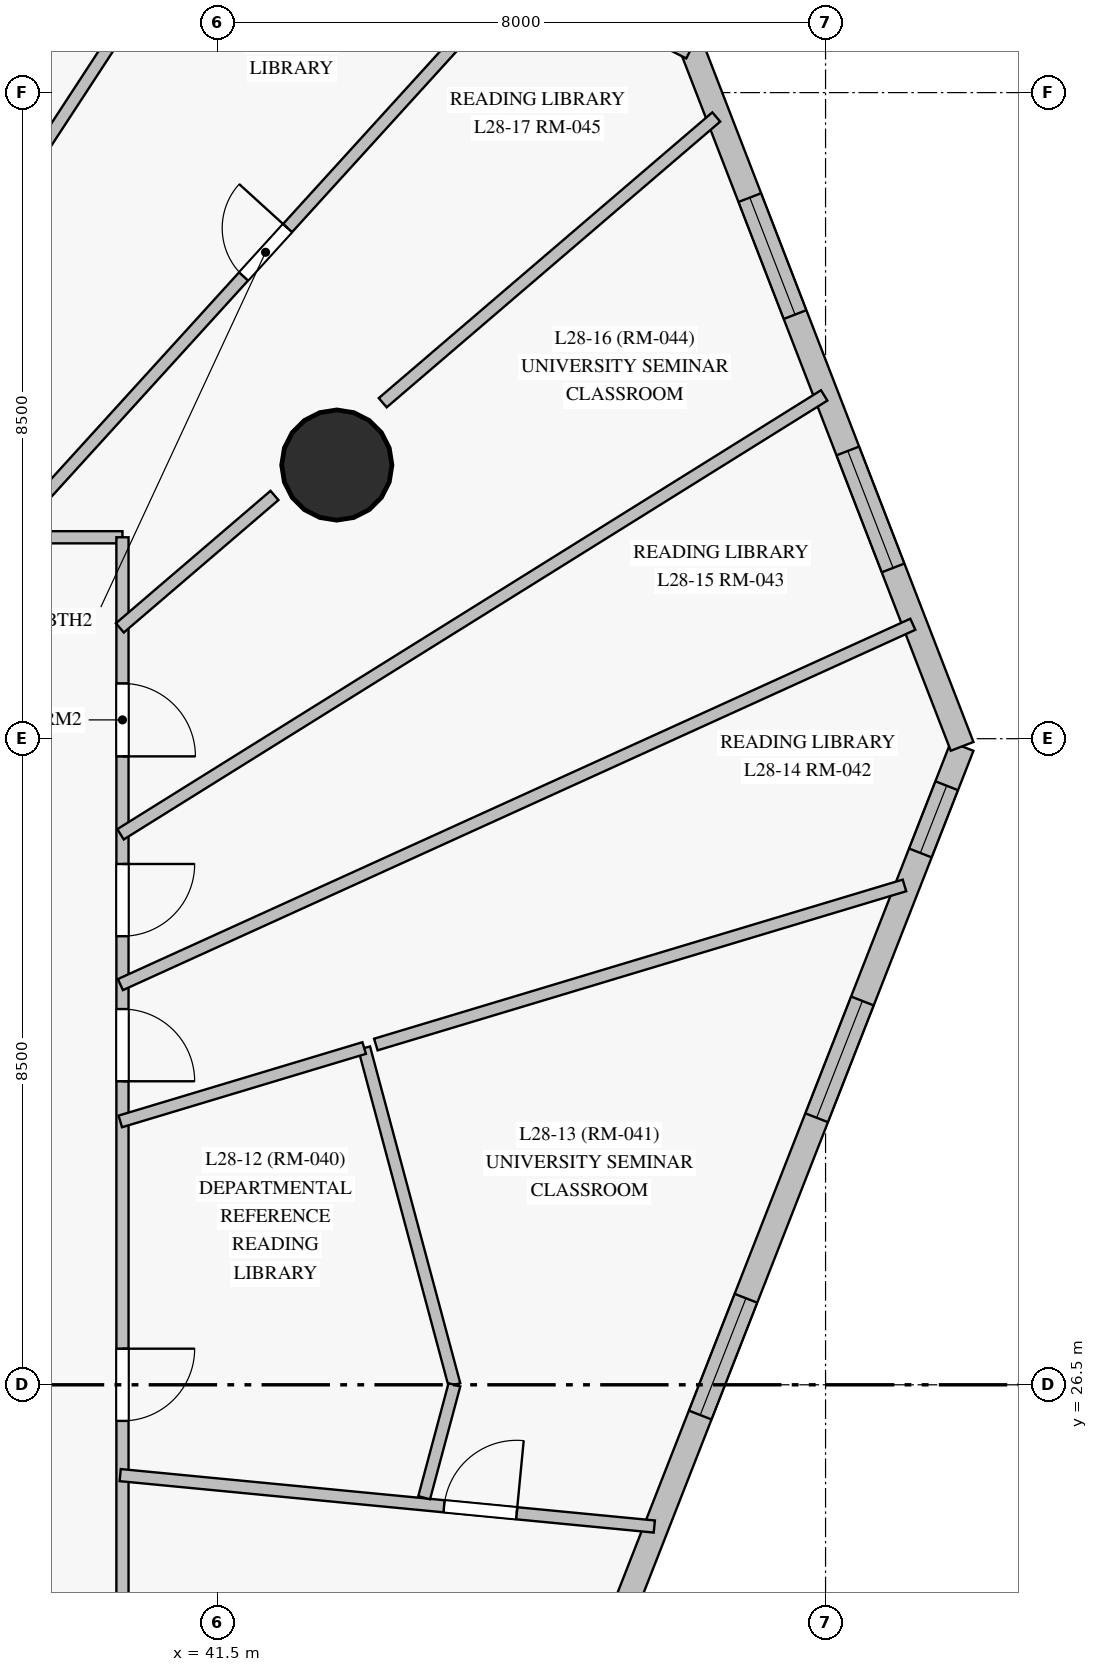
"""IFC4 building model, lengths in metres.
Left out: names, types, materials, properties, quantities, classifications, styles, units other than length and angle.
Written with IfcOpenShell. Run it as: python <this file> out.ifc"""

import sys

from ifc_helpers import new_model, si_unit, direction, frame, frame_2d, origin, origin_with_axes, origin_2d, place, context, subcontext, project, spatial, rectangle, circle, extrude, source, transform, mapped, element, fill, save


model = new_model("IFC4")
c1 = context("Model", 3, precision=1e-05, world=origin(), true_north=direction((0.0, 1.0)))
c2 = subcontext(c1, "Body", "Model", "MODEL_VIEW")
j1 = project(units=[si_unit("LENGTHUNIT", "METRE"), si_unit("PLANEANGLEUNIT", "RADIAN")], contexts=[c1])
p1 = place(None, origin())
s1 = spatial("IfcSite", under=j1, at=p1, CompositionType="ELEMENT")
p2 = place(p1, origin())
s2 = spatial("IfcBuilding", under=s1, at=p2, CompositionType="ELEMENT")
p3 = place(p2, frame((0.0, 0.0, 105.35)))
s3 = spatial("IfcBuildingStorey", under=s2, at=p3, CompositionType="ELEMENT", Elevation=105.35)
m1 = source(origin_with_axes(), c2, "Body", "SweptSolid", [
    extrude(circle(Radius=0.725, at=origin_2d()), origin(), (0.0, 0.0, 1.0), 3.05),
])
p4 = place(p3, frame((43.07, 38.6, 0.0), z_axis=(0.0, 0.0, 1.0), x_axis=(1.0, 0.0, 0.0)))
e1 = element("IfcColumn", 1, at=p4, inside=s3, PredefinedType="COLUMN", context=c2, shape_type="MappedRepresentation", body=[
    mapped(m1, transform((0.0, 0.0, 0.0), scale=1.0)),
])
p5 = place(p3, frame((45.925, 21.186, 0.0), z_axis=(0.0, 0.0, 1.0), x_axis=(0.364698725117, 0.931125576868, 0.0)))
e2 = element("IfcWall", 2, at=p5, inside=s3, PredefinedType="SOLIDWALL", context=c2, shape_type="SweptSolid", body=[
    extrude(rectangle(XDim=14.728, YDim=0.32, at=frame_2d((7.364, 0.0))), origin(), (0.0, 0.0, 1.0), 2.825),
])
p6 = place(p5, frame((1.047, 0.0, 0.85)))
e3 = element("IfcOpeningElement", 3, at=p6, cuts=e2, PredefinedType="OPENING", context=c2, shape_type="SweptSolid", body=[
    extrude(rectangle(XDim=1.65, YDim=1.65, at=frame_2d((0.825, 0.825))), frame((0.0, 0.17, 0.0), z_axis=(0.0, -1.0, 0.0), x_axis=(1.0, 0.0, 0.0)), (0.0, 0.0, 1.0), 0.34),
])
p7 = place(p5, frame((5.28, 0.0, 0.85)))
e4 = element("IfcOpeningElement", 4, at=p7, cuts=e2, PredefinedType="OPENING", context=c2, shape_type="SweptSolid", body=[
    extrude(rectangle(XDim=1.65, YDim=1.65, at=frame_2d((0.825, 0.825))), frame((0.0, 0.17, 0.0), z_axis=(0.0, -1.0, 0.0), x_axis=(1.0, 0.0, 0.0)), (0.0, 0.0, 1.0), 0.34),
])
p8 = place(p5, frame((9.481, 0.0, 0.85)))
e5 = element("IfcOpeningElement", 5, at=p8, cuts=e2, PredefinedType="OPENING", context=c2, shape_type="SweptSolid", body=[
    extrude(rectangle(XDim=1.65, YDim=1.65, at=frame_2d((0.825, 0.825))), frame((0.0, 0.17, 0.0), z_axis=(0.0, -1.0, 0.0), x_axis=(1.0, 0.0, 0.0)), (0.0, 0.0, 1.0), 0.34),
])
p9 = place(p5, frame((13.222, 0.0, 0.85)))
e6 = element("IfcOpeningElement", 6, at=p9, cuts=e2, PredefinedType="OPENING", context=c2, shape_type="SweptSolid", body=[
    extrude(rectangle(XDim=0.95, YDim=1.5, at=frame_2d((0.475, 0.75))), frame((0.0, 0.17, 0.0), z_axis=(0.0, -1.0, 0.0), x_axis=(1.0, 0.0, 0.0)), (0.0, 0.0, 1.0), 0.34),
])
p10 = place(p3, frame((51.296, 34.899, 0.0), z_axis=(0.0, 0.0, 1.0), x_axis=(-0.360827329773, 0.932632638336, 0.0)))
e7 = element("IfcWall", 7, at=p10, inside=s3, PredefinedType="SOLIDWALL", context=c2, shape_type="SweptSolid", body=[
    extrude(rectangle(XDim=9.857, YDim=0.32, at=frame_2d((4.928, 0.0))), origin(), (0.0, 0.0, 1.0), 2.825),
])
p11 = place(p10, frame((2.517, 0.0, 0.85)))
e8 = element("IfcOpeningElement", 8, at=p11, cuts=e7, PredefinedType="OPENING", context=c2, shape_type="SweptSolid", body=[
    extrude(rectangle(XDim=1.65, YDim=1.65, at=frame_2d((0.825, 0.825))), frame((0.0, 0.17, 0.0), z_axis=(0.0, -1.0, 0.0), x_axis=(1.0, 0.0, 0.0)), (0.0, 0.0, 1.0), 0.34),
])
p12 = place(p10, frame((6.091, 0.0, 0.85)))
e9 = element("IfcOpeningElement", 9, at=p12, cuts=e7, PredefinedType="OPENING", context=c2, shape_type="SweptSolid", body=[
    extrude(rectangle(XDim=1.65, YDim=1.65, at=frame_2d((0.825, 0.825))), frame((0.0, 0.17, 0.0), z_axis=(0.0, -1.0, 0.0), x_axis=(1.0, 0.0, 0.0)), (0.0, 0.0, 1.0), 0.34),
])
p13 = place(p3, frame((47.74, 44.092, 0.0), z_axis=(0.0, 0.0, 1.0), x_axis=(-0.890845819917, 0.454305761725, 0.0)))
e10 = element("IfcWall", 10, at=p13, inside=s3, PredefinedType="SOLIDWALL", context=c2, shape_type="SweptSolid", body=[
    extrude(rectangle(XDim=12.299, YDim=0.32, at=frame_2d((6.15, 0.0))), origin(), (0.0, 0.0, 1.0), 2.825),
])
p14 = place(p13, frame((0.549, 0.0, 0.85)))
e11 = element("IfcOpeningElement", 11, at=p14, cuts=e10, PredefinedType="OPENING", context=c2, shape_type="SweptSolid", body=[
    extrude(rectangle(XDim=1.4, YDim=1.65, at=frame_2d((0.7, 0.825))), frame((0.0, 0.17, 0.0), z_axis=(0.0, -1.0, 0.0), x_axis=(1.0, 0.0, 0.0)), (0.0, 0.0, 1.0), 0.34),
])
p15 = place(p13, frame((3.63, 0.0, 0.85)))
e12 = element("IfcOpeningElement", 12, at=p15, cuts=e10, PredefinedType="OPENING", context=c2, shape_type="SweptSolid", body=[
    extrude(rectangle(XDim=1.65, YDim=1.65, at=frame_2d((0.825, 0.825))), frame((0.0, 0.17, 0.0), z_axis=(0.0, -1.0, 0.0), x_axis=(1.0, 0.0, 0.0)), (0.0, 0.0, 1.0), 0.34),
])
p16 = place(p13, frame((8.068, 0.0, 0.85)))
e13 = element("IfcOpeningElement", 13, at=p16, cuts=e10, PredefinedType="OPENING", context=c2, shape_type="SweptSolid", body=[
    extrude(rectangle(XDim=1.65, YDim=1.65, at=frame_2d((0.825, 0.825))), frame((0.0, 0.17, 0.0), z_axis=(0.0, -1.0, 0.0), x_axis=(1.0, 0.0, 0.0)), (0.0, 0.0, 1.0), 0.34),
])
p17 = place(p3, frame((11.018, 37.65, 0.0), z_axis=(0.0, 0.0, 1.0), x_axis=(1.0, 0.0, 0.0)))
e14 = element("IfcWall", 14, at=p17, inside=s3, PredefinedType="PARTITIONING", context=c2, shape_type="SweptSolid", body=[
    extrude(rectangle(XDim=29.232, YDim=0.16, at=frame_2d((14.616, 0.0))), origin(), (0.0, 0.0, 1.0), 2.325),
])
p18 = place(p17, frame((26.519, 0.0, 0.0)))
e15 = element("IfcOpeningElement", 15, at=p18, cuts=e14, PredefinedType="OPENING", context=c2, shape_type="SweptSolid", body=[
    extrude(rectangle(XDim=0.95, YDim=2.15, at=frame_2d((0.475, 1.075))), frame((0.0, 0.09, 0.0), z_axis=(0.0, -1.0, 0.0), x_axis=(1.0, 0.0, 0.0)), (0.0, 0.0, 1.0), 0.18),
])
p19 = place(p17, frame((25.426, 0.0, 0.0)))
e16 = element("IfcOpeningElement", 16, at=p19, cuts=e14, PredefinedType="OPENING", context=c2, shape_type="SweptSolid", body=[
    extrude(rectangle(XDim=0.95, YDim=2.15, at=frame_2d((0.475, 1.075))), frame((0.0, 0.09, 0.0), z_axis=(0.0, -1.0, 0.0), x_axis=(1.0, 0.0, 0.0)), (0.0, 0.0, 1.0), 0.18),
])
p20 = place(p17, frame((22.805, 0.0, 0.0)))
e17 = element("IfcOpeningElement", 17, at=p20, cuts=e14, PredefinedType="OPENING", context=c2, shape_type="SweptSolid", body=[
    extrude(rectangle(XDim=0.96, YDim=2.15, at=frame_2d((0.48, 1.075))), frame((0.0, 0.09, 0.0), z_axis=(0.0, -1.0, 0.0), x_axis=(1.0, 0.0, 0.0)), (0.0, 0.0, 1.0), 0.18),
])
p21 = place(p17, frame((14.375, 0.0, 0.0)))
e18 = element("IfcOpeningElement", 18, at=p21, cuts=e14, PredefinedType="OPENING", context=c2, shape_type="SweptSolid", body=[
    extrude(rectangle(XDim=0.96, YDim=2.15, at=frame_2d((0.48, 1.075))), frame((0.0, 0.09, 0.0), z_axis=(0.0, -1.0, 0.0), x_axis=(1.0, 0.0, 0.0)), (0.0, 0.0, 1.0), 0.18),
])
p22 = place(p17, frame((9.717, 0.0, 0.0)))
e19 = element("IfcOpeningElement", 19, at=p22, cuts=e14, PredefinedType="OPENING", context=c2, shape_type="SweptSolid", body=[
    extrude(rectangle(XDim=0.95, YDim=2.15, at=frame_2d((0.475, 1.075))), frame((0.0, 0.09, 0.0), z_axis=(0.0, -1.0, 0.0), x_axis=(1.0, 0.0, 0.0)), (0.0, 0.0, 1.0), 0.18),
])
p23 = place(p17, frame((10.845, 0.0, 0.0)))
e20 = element("IfcOpeningElement", 20, at=p23, cuts=e14, PredefinedType="OPENING", context=c2, shape_type="SweptSolid", body=[
    extrude(rectangle(XDim=0.96, YDim=2.15, at=frame_2d((0.48, 1.075))), frame((0.0, 0.09, 0.0), z_axis=(0.0, -1.0, 0.0), x_axis=(1.0, 0.0, 0.0)), (0.0, 0.0, 1.0), 0.18),
])
p24 = place(p17, frame((1.751, 0.0, 0.0)))
e21 = element("IfcOpeningElement", 21, at=p24, cuts=e14, PredefinedType="OPENING", context=c2, shape_type="SweptSolid", body=[
    extrude(rectangle(XDim=0.86, YDim=2.04, at=frame_2d((0.43, 1.02))), frame((0.0, 0.09, 0.0), z_axis=(0.0, -1.0, 0.0), x_axis=(1.0, 0.0, 0.0)), (0.0, 0.0, 1.0), 0.18),
])
p25 = place(p3, frame((40.25, 37.65, 0.0), z_axis=(0.0, 0.0, 1.0), x_axis=(0.0, -1.0, 0.0)))
e22 = element("IfcWall", 22, at=p25, inside=s3, PredefinedType="PARTITIONING", context=c2, shape_type="SweptSolid", body=[
    extrude(rectangle(XDim=22.3, YDim=0.16, at=frame_2d((11.15, 0.0))), origin(), (0.0, 0.0, 1.0), 2.225),
])
p26 = place(p25, frame((14.02, 0.0, 0.0)))
e23 = element("IfcOpeningElement", 23, at=p26, cuts=e22, PredefinedType="OPENING", context=c2, shape_type="SweptSolid", body=[
    extrude(rectangle(XDim=0.95, YDim=2.15, at=frame_2d((0.475, 1.075))), frame((0.0, 0.09, 0.0), z_axis=(0.0, -1.0, 0.0), x_axis=(1.0, 0.0, 0.0)), (0.0, 0.0, 1.0), 0.18),
])
p27 = place(p25, frame((10.675, 0.0, 0.0)))
e24 = element("IfcOpeningElement", 24, at=p27, cuts=e22, PredefinedType="OPENING", context=c2, shape_type="SweptSolid", body=[
    extrude(rectangle(XDim=0.95, YDim=2.15, at=frame_2d((0.475, 1.075))), frame((0.0, 0.09, 0.0), z_axis=(0.0, -1.0, 0.0), x_axis=(1.0, 0.0, 0.0)), (0.0, 0.0, 1.0), 0.18),
])
p28 = place(p25, frame((6.207, 0.0, 0.0)))
e25 = element("IfcOpeningElement", 25, at=p28, cuts=e22, PredefinedType="OPENING", context=c2, shape_type="SweptSolid", body=[
    extrude(rectangle(XDim=0.95, YDim=2.15, at=frame_2d((0.475, 1.075))), frame((0.0, 0.09, 0.0), z_axis=(0.0, -1.0, 0.0), x_axis=(1.0, 0.0, 0.0)), (0.0, 0.0, 1.0), 0.18),
])
p29 = place(p25, frame((4.298, 0.0, 0.0)))
e26 = element("IfcOpeningElement", 26, at=p29, cuts=e22, PredefinedType="OPENING", context=c2, shape_type="SweptSolid", body=[
    extrude(rectangle(XDim=0.95, YDim=2.15, at=frame_2d((0.475, 1.075))), frame((0.0, 0.09, 0.0), z_axis=(0.0, -1.0, 0.0), x_axis=(1.0, 0.0, 0.0)), (0.0, 0.0, 1.0), 0.18),
])
p30 = place(p25, frame((1.923, 0.0, 0.0)))
e27 = element("IfcOpeningElement", 27, at=p30, cuts=e22, PredefinedType="OPENING", context=c2, shape_type="SweptSolid", body=[
    extrude(rectangle(XDim=0.96, YDim=2.15, at=frame_2d((0.48, 1.075))), frame((0.0, 0.09, 0.0), z_axis=(0.0, -1.0, 0.0), x_axis=(1.0, 0.0, 0.0)), (0.0, 0.0, 1.0), 0.18),
])
p31 = place(p3, frame((40.223, 31.765, 0.0), z_axis=(0.0, 0.0, 1.0), x_axis=(0.910305874459, 0.413936245, 0.0)))
e28 = element("IfcWall", 28, at=p31, inside=s3, PredefinedType="PARTITIONING", context=c2, shape_type="SweptSolid", body=[
    extrude(rectangle(XDim=11.453, YDim=0.16, at=frame_2d((5.727, 0.0))), origin(), (0.0, 0.0, 1.0), 2.825),
])
p32 = place(p3, frame((35.83, 37.612, 0.0), z_axis=(0.0, 0.0, 1.0), x_axis=(0.546828428928, 0.837244689034, 0.0)))
e29 = element("IfcWall", 29, at=p32, inside=s3, PredefinedType="PARTITIONING", context=c2, shape_type="SweptSolid", body=[
    extrude(rectangle(XDim=11.222, YDim=0.16, at=frame_2d((5.611, 0.0))), origin(), (0.0, 0.0, 1.0), 2.825),
])
p33 = place(p3, frame((40.225, 33.742, 0.0), z_axis=(0.0, 0.0, 1.0), x_axis=(0.848478174112, 0.52923037333, 0.0)))
e30 = element("IfcWall", 30, at=p33, inside=s3, PredefinedType="PARTITIONING", context=c2, shape_type="SweptSolid", body=[
    extrude(rectangle(XDim=10.91, YDim=0.16, at=frame_2d((5.455, 0.0))), origin(), (0.0, 0.0, 1.0), 2.825),
])
p34 = place(p3, frame((38.702, 37.628, 0.0), z_axis=(0.0, 0.0, 1.0), x_axis=(0.672855104657, 0.739774295402, 0.0)))
e31 = element("IfcWall", 31, at=p34, inside=s3, PredefinedType="PARTITIONING", context=c2, shape_type="SweptSolid", body=[
    extrude(rectangle(XDim=10.197, YDim=0.16, at=frame_2d((5.099, 0.0))), origin(), (0.0, 0.0, 1.0), 2.825),
])
p35 = place(p34, frame((4.668, 0.0, 0.0)))
e32 = element("IfcOpeningElement", 32, at=p35, cuts=e31, PredefinedType="OPENING", context=c2, shape_type="SweptSolid", body=[
    extrude(rectangle(XDim=0.86, YDim=2.04, at=frame_2d((0.43, 1.02))), frame((0.0, 0.09, 0.0), z_axis=(0.0, -1.0, 0.0), x_axis=(1.0, 0.0, 0.0)), (0.0, 0.0, 1.0), 0.18),
])
p36 = place(p3, frame((43.583, 30.977, 0.0), z_axis=(0.0, 0.0, 1.0), x_axis=(0.957577055115, 0.288177347334, 0.0)))
e33 = element("IfcWall", 33, at=p36, inside=s3, PredefinedType="PARTITIONING", context=c2, shape_type="SweptSolid", body=[
    extrude(rectangle(XDim=7.263, YDim=0.16, at=frame_2d((3.631, 0.0))), origin(), (0.0, 0.0, 1.0), 2.825),
])
p37 = place(p3, frame((40.22, 25.312, 0.0), z_axis=(0.0, 0.0, 1.0), x_axis=(0.995397172011, -0.095835640306, 0.0)))
e34 = element("IfcWall", 34, at=p37, inside=s3, PredefinedType="PARTITIONING", context=c2, shape_type="SweptSolid", body=[
    extrude(rectangle(XDim=7.059, YDim=0.16, at=frame_2d((3.53, 0.0))), origin(), (0.0, 0.0, 1.0), 2.825),
])
p38 = place(p37, frame((4.281, 0.0, 0.0)))
e35 = element("IfcOpeningElement", 35, at=p38, cuts=e34, PredefinedType="OPENING", context=c2, shape_type="SweptSolid", body=[
    extrude(rectangle(XDim=0.96, YDim=2.15, at=frame_2d((0.48, 1.075))), frame((0.0, 0.09, 0.0), z_axis=(0.0, -1.0, 0.0), x_axis=(1.0, 0.0, 0.0)), (0.0, 0.0, 1.0), 0.18),
])
p39 = place(p3, frame((43.674, 39.42, 0.0), z_axis=(0.0, 0.0, 1.0), x_axis=(0.759429558406, 0.650589537128, 0.0)))
e36 = element("IfcWall", 36, at=p39, inside=s3, PredefinedType="PARTITIONING", context=c2, shape_type="SweptSolid", body=[
    extrude(rectangle(XDim=5.778, YDim=0.16, at=frame_2d((2.889, 0.0))), origin(), (0.0, 0.0, 1.0), 2.825),
])
p40 = place(p3, frame((43.43, 30.93, 0.0), z_axis=(0.0, 0.0, 1.0), x_axis=(0.258795505206, -0.965932133478, 0.0)))
e37 = element("IfcWall", 37, at=p40, inside=s3, PredefinedType="PARTITIONING", context=c2, shape_type="SweptSolid", body=[
    extrude(rectangle(XDim=4.587, YDim=0.16, at=frame_2d((2.293, 0.0))), origin(), (0.0, 0.0, 1.0), 2.225),
])
p41 = place(p3, frame((40.221, 29.965, 0.0), z_axis=(0.0, 0.0, 1.0), x_axis=(0.957569249554, 0.288203282961, 0.0)))
e38 = element("IfcWall", 38, at=p41, inside=s3, PredefinedType="PARTITIONING", context=c2, shape_type="SweptSolid", body=[
    extrude(rectangle(XDim=3.351, YDim=0.16, at=frame_2d((1.676, 0.0))), origin(), (0.0, 0.0, 1.0), 2.825),
])
p42 = place(p3, frame((40.216, 36.458, 0.0), z_axis=(0.0, 0.0, 1.0), x_axis=(0.75946888982, 0.650543622977, 0.0)))
e39 = element("IfcWall", 39, at=p42, inside=s3, PredefinedType="PARTITIONING", context=c2, shape_type="SweptSolid", body=[
    extrude(rectangle(XDim=2.678, YDim=0.16, at=frame_2d((1.339, 0.0))), origin(), (0.0, 0.0, 1.0), 2.225),
])
p43 = place(p3, frame((44.617, 26.5, 0.0), z_axis=(0.0, 0.0, 1.0), x_axis=(-0.258897414575, -0.965904823845, 0.0)))
e40 = element("IfcWall", 40, at=p43, inside=s3, PredefinedType="PARTITIONING", context=c2, shape_type="SweptSolid", body=[
    extrude(rectangle(XDim=1.538, YDim=0.16, at=frame_2d((0.769, 0.0))), origin(), (0.0, 0.0, 1.0), 2.825),
])
m2 = source(origin_with_axes(), c2, "Body", "SweptSolid", [
    extrude(rectangle(XDim=1.65, YDim=1.65, at=frame_2d((0.825, 0.825))), frame((0.0, 0.03, 0.0), z_axis=(0.0, -1.0, 0.0), x_axis=(1.0, 0.0, 0.0)), (0.0, 0.0, 1.0), 0.06),
])
p44 = place(p7, origin())
e41 = element("IfcWindow", 41, at=p44, inside=s3, PartitioningType="SINGLE_PANEL", PredefinedType="WINDOW", context=c2, shape_type="MappedRepresentation", body=[
    mapped(m2, transform((0.0, 0.0, 0.0), scale=1.0)),
])
fill(e4, e41)
p45 = place(p8, origin())
e42 = element("IfcWindow", 42, at=p45, inside=s3, PartitioningType="SINGLE_PANEL", PredefinedType="WINDOW", context=c2, shape_type="MappedRepresentation", body=[
    mapped(m2, transform((0.0, 0.0, 0.0), scale=1.0)),
])
fill(e5, e42)
m3 = source(origin_with_axes(), c2, "Body", "SweptSolid", [
    extrude(rectangle(XDim=0.95, YDim=1.5, at=frame_2d((0.475, 0.75))), frame((0.0, 0.03, 0.0), z_axis=(0.0, -1.0, 0.0), x_axis=(1.0, 0.0, 0.0)), (0.0, 0.0, 1.0), 0.06),
])
p46 = place(p9, origin())
e43 = element("IfcWindow", 43, at=p46, inside=s3, PartitioningType="SINGLE_PANEL", PredefinedType="WINDOW", context=c2, shape_type="MappedRepresentation", body=[
    mapped(m3, transform((0.0, 0.0, 0.0), scale=1.0)),
])
fill(e6, e43)
p47 = place(p11, origin())
e44 = element("IfcWindow", 44, at=p47, inside=s3, PartitioningType="SINGLE_PANEL", PredefinedType="WINDOW", context=c2, shape_type="MappedRepresentation", body=[
    mapped(m2, transform((0.0, 0.0, 0.0), scale=1.0)),
])
fill(e8, e44)
p48 = place(p12, origin())
e45 = element("IfcWindow", 45, at=p48, inside=s3, PartitioningType="SINGLE_PANEL", PredefinedType="WINDOW", context=c2, shape_type="MappedRepresentation", body=[
    mapped(m2, transform((0.0, 0.0, 0.0), scale=1.0)),
])
fill(e9, e45)
m4 = source(origin_with_axes(), c2, "Body", "SweptSolid", [
    extrude(rectangle(XDim=0.95, YDim=2.15, at=frame_2d((0.475, 1.075))), frame((0.0, 0.025, 0.0), z_axis=(0.0, -1.0, 0.0), x_axis=(1.0, 0.0, 0.0)), (0.0, 0.0, 1.0), 0.05),
])
p49 = place(p27, origin())
e46 = element("IfcDoor", 46, at=p49, inside=s3, OperationType="SINGLE_SWING_LEFT", PredefinedType="DOOR", context=c2, shape_type="MappedRepresentation", body=[
    mapped(m4, transform((0.0, 0.0, 0.0), scale=1.0)),
])
fill(e24, e46)
p50 = place(p28, origin())
e47 = element("IfcDoor", 47, at=p50, inside=s3, OperationType="SINGLE_SWING_RIGHT", PredefinedType="DOOR", context=c2, shape_type="MappedRepresentation", body=[
    mapped(m4, transform((0.0, 0.0, 0.0), scale=1.0)),
])
fill(e25, e47)
p51 = place(p29, origin())
e48 = element("IfcDoor", 48, at=p51, inside=s3, OperationType="SINGLE_SWING_LEFT", PredefinedType="DOOR", context=c2, shape_type="MappedRepresentation", body=[
    mapped(m4, transform((0.0, 0.0, 0.0), scale=1.0)),
])
fill(e26, e48)
m5 = source(origin_with_axes(), c2, "Body", "SweptSolid", [
    extrude(rectangle(XDim=0.96, YDim=2.15, at=frame_2d((0.48, 1.075))), frame((0.0, 0.025, 0.0), z_axis=(0.0, -1.0, 0.0), x_axis=(1.0, 0.0, 0.0)), (0.0, 0.0, 1.0), 0.05),
])
p52 = place(p30, origin())
e49 = element("IfcDoor", 49, at=p52, inside=s3, OperationType="SINGLE_SWING_RIGHT", PredefinedType="DOOR", context=c2, shape_type="MappedRepresentation", body=[
    mapped(m5, transform((0.0, 0.0, 0.0), scale=1.0)),
])
fill(e27, e49)
p53 = place(p38, origin())
e50 = element("IfcDoor", 50, at=p53, inside=s3, OperationType="SINGLE_SWING_RIGHT", PredefinedType="DOOR", context=c2, shape_type="MappedRepresentation", body=[
    mapped(m5, transform((0.0, 0.0, 0.0), scale=1.0)),
])
fill(e35, e50)
m6 = source(origin_with_axes(), c2, "Body", "SweptSolid", [
    extrude(rectangle(XDim=0.86, YDim=2.04, at=frame_2d((0.43, 1.02))), frame((0.0, 0.025, 0.0), z_axis=(0.0, -1.0, 0.0), x_axis=(1.0, 0.0, 0.0)), (0.0, 0.0, 1.0), 0.05),
])
p54 = place(p35, origin())
e51 = element("IfcDoor", 51, at=p54, inside=s3, OperationType="SINGLE_SWING_RIGHT", PredefinedType="DOOR", context=c2, shape_type="MappedRepresentation", body=[
    mapped(m6, transform((0.0, 0.0, 0.0), scale=1.0)),
])
fill(e32, e51)
save(model, sys.argv[1])
